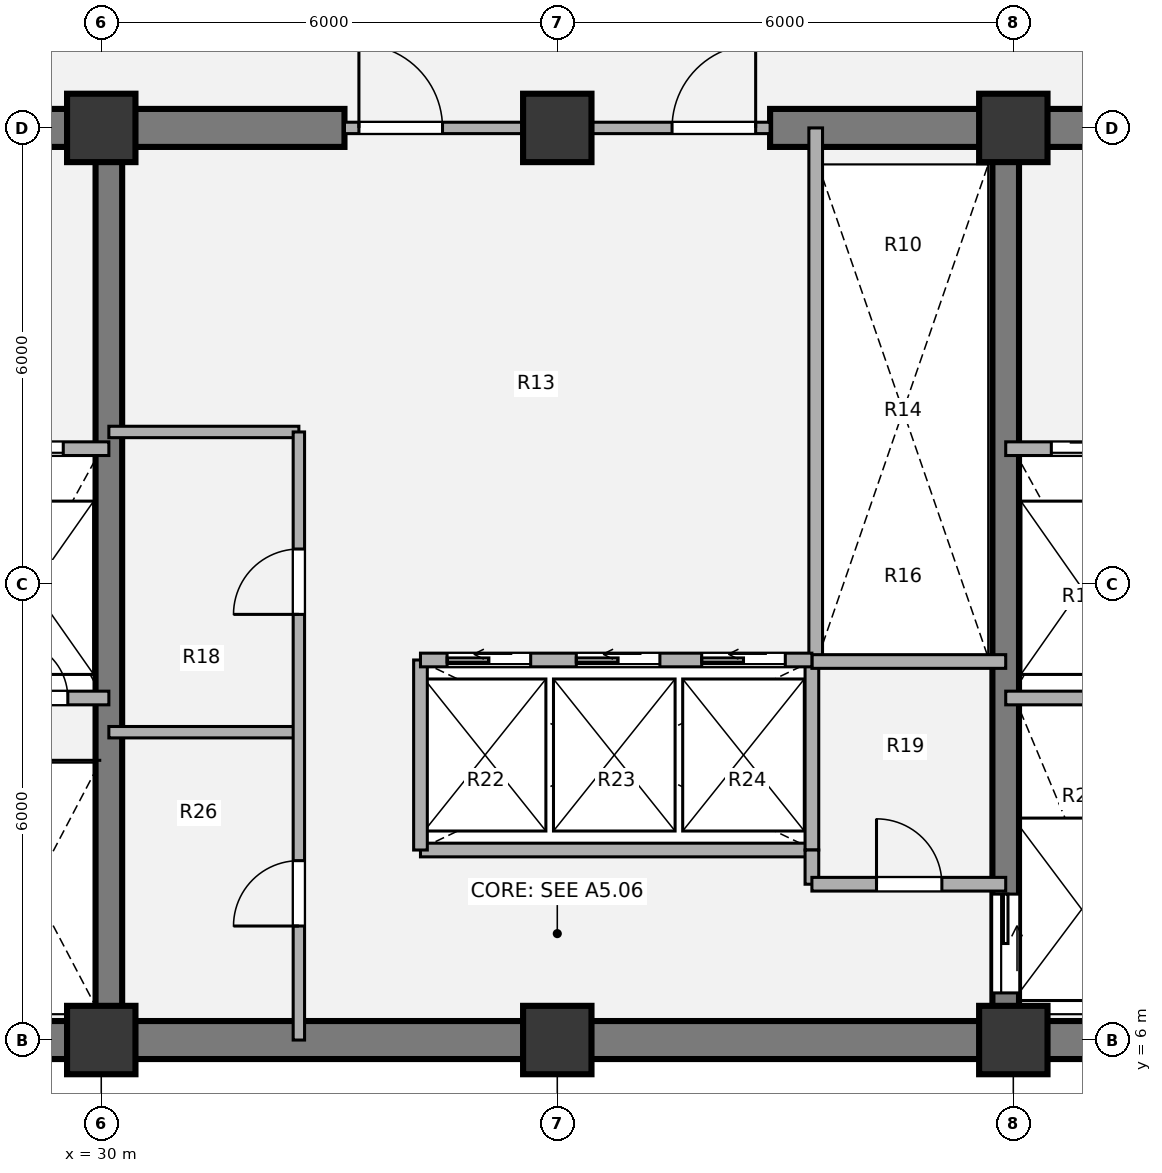
"""IFC4 building model, lengths in metres.
Left out: names, types, materials, properties, quantities, classifications, styles, units other than length and angle.
Written with IfcOpenShell. Run it as: python <this file> out.ifc"""

import sys

from ifc_helpers import new_model, si_unit, direction, frame, frame_2d, origin, origin_2d, place, context, subcontext, project, spatial, rectangle, extrude, source, transform, mapped, element, fill, save


model = new_model("IFC4")
c1 = context("Model", 3, precision=1e-05, world=origin(), true_north=direction((0.0, 1.0)))
c2 = subcontext(c1, "Body", "Model", "MODEL_VIEW")
j1 = project(units=[si_unit("LENGTHUNIT", "METRE"), si_unit("PLANEANGLEUNIT", "RADIAN")], contexts=[c1])
p1 = place(None, origin())
s1 = spatial("IfcSite", under=j1, at=p1, CompositionType="ELEMENT")
p2 = place(p1, origin())
s2 = spatial("IfcBuilding", under=s1, at=p2, CompositionType="ELEMENT")
p3 = place(p2, frame((0.0, 0.0, 108.72)))
s3 = spatial("IfcBuildingStorey", under=s2, at=p3, CompositionType="ELEMENT", Elevation=108.72)
m1 = source(origin(), c2, "Body", "SweptSolid", [
    extrude(rectangle(XDim=0.9, YDim=0.9, at=origin_2d()), origin(), (0.0, 0.0, 1.0), 3.78),
])
for number, where, z_axis, x_axis in (
    (1, (30.0, 6.0, 0.0), (0.0, 0.0, 1.0), (1.0, 0.0, 0.0)),
    (2, (36.0, 6.0, 0.0), (0.0, 0.0, 1.0), (1.0, 0.0, 0.0)),
    (3, (42.0, 6.0, 0.0), (0.0, 0.0, 1.0), (1.0, 0.0, 0.0)),
    (4, (30.0, 18.0, 0.0), (0.0, 0.0, 1.0), (1.0, 0.0, 0.0)),
    (5, (36.0, 18.0, 0.0), (0.0, 0.0, 1.0), (1.0, 0.0, 0.0)),
    (6, (42.0, 18.0, 0.0), (0.0, 0.0, 1.0), (1.0, 0.0, 0.0)),
):
    element("IfcColumn", number, at=place(p3, frame(where, z_axis=z_axis, x_axis=x_axis)), inside=s3, PredefinedType="COLUMN", context=c2, shape_type="MappedRepresentation", body=[
        mapped(m1, transform((0.0, 0.0, 0.0), x_axis=(1.0, 0.0, 0.0), y_axis=(0.0, 1.0, 0.0), z_axis=(0.0, 0.0, 1.0), scale=1.0)),
    ])
p4 = place(p3, frame((48.25, 6.0, 0.0), z_axis=(0.0, 0.0, 1.0), x_axis=(-1.0, 0.0, 0.0)))
e7 = element("IfcWall", 7, at=p4, inside=s3, PredefinedType="SHEAR", context=c2, shape_type="SweptSolid", body=[
    extrude(rectangle(XDim=24.5, YDim=0.5, at=frame_2d((12.25, 0.0))), origin(), (0.0, 0.0, 1.0), 3.78),
])
p5 = place(p3, frame((23.75, 18.0, 0.0), z_axis=(0.0, 0.0, 1.0), x_axis=(1.0, 0.0, 0.0)))
e8 = element("IfcWall", 8, at=p5, inside=s3, PredefinedType="SHEAR", context=c2, shape_type="SweptSolid", body=[
    extrude(rectangle(XDim=9.45, YDim=0.5, at=frame_2d((4.725, 0.0))), origin(), (0.0, 0.0, 1.0), 3.78),
])
p6 = place(p5, frame((2.95, 0.0, 0.0)))
e9 = element("IfcOpeningElement", 9, at=p6, cuts=e8, PredefinedType="OPENING", context=c2, shape_type="SweptSolid", body=[
    extrude(rectangle(XDim=1.1, YDim=2.1, at=origin_2d()), frame((0.55, 0.26, 1.05), z_axis=(0.0, -1.0, 0.0), x_axis=(1.0, 0.0, 0.0)), (0.0, 0.0, 1.0), 0.52),
])
p7 = place(p3, frame((38.8, 18.0, 0.0), z_axis=(0.0, 0.0, 1.0), x_axis=(1.0, 0.0, 0.0)))
e10 = element("IfcWall", 10, at=p7, inside=s3, PredefinedType="SHEAR", context=c2, shape_type="SweptSolid", body=[
    extrude(rectangle(XDim=9.45, YDim=0.5, at=frame_2d((4.725, 0.0))), origin(), (0.0, 0.0, 1.0), 3.78),
])
p8 = place(p7, frame((5.45, 0.0, 0.0)))
e11 = element("IfcOpeningElement", 11, at=p8, cuts=e10, PredefinedType="OPENING", context=c2, shape_type="SweptSolid", body=[
    extrude(rectangle(XDim=1.1, YDim=2.1, at=origin_2d()), frame((0.55, 0.26, 1.05), z_axis=(0.0, -1.0, 0.0), x_axis=(1.0, 0.0, 0.0)), (0.0, 0.0, 1.0), 0.52),
])
p9 = place(p3, frame((30.1, 6.0, 0.0), z_axis=(0.0, 0.0, 1.0), x_axis=(0.0, 1.0, 0.0)))
e12 = element("IfcWall", 12, at=p9, inside=s3, PredefinedType="SHEAR", context=c2, shape_type="SweptSolid", body=[
    extrude(rectangle(XDim=12.0, YDim=0.35, at=frame_2d((6.0, 0.0))), origin(), (0.0, 0.0, 1.0), 3.78),
])
p10 = place(p3, frame((41.9, 18.0, 0.0), z_axis=(0.0, 0.0, 1.0), x_axis=(0.0, -1.0, 0.0)))
e13 = element("IfcWall", 13, at=p10, inside=s3, PredefinedType="SHEAR", context=c2, shape_type="SweptSolid", body=[
    extrude(rectangle(XDim=12.0, YDim=0.35, at=frame_2d((6.0, 0.0))), origin(), (0.0, 0.0, 1.0), 3.78),
])
p11 = place(p10, frame((10.08, 0.0, 0.0)))
e14 = element("IfcOpeningElement", 14, at=p11, cuts=e13, PredefinedType="OPENING", context=c2, shape_type="SweptSolid", body=[
    extrude(rectangle(XDim=1.3, YDim=2.1, at=origin_2d()), frame((0.65, 0.185, 1.05), z_axis=(0.0, -1.0, 0.0), x_axis=(1.0, 0.0, 0.0)), (0.0, 0.0, 1.0), 0.37),
])
p12 = place(p3, frame((30.1, 14.0, 0.0), z_axis=(0.0, 0.0, 1.0), x_axis=(1.0, 0.0, 0.0)))
e15 = element("IfcWall", 15, at=p12, inside=s3, PredefinedType="PARTITIONING", context=c2, shape_type="SweptSolid", body=[
    extrude(rectangle(XDim=2.5, YDim=0.15, at=frame_2d((1.25, 0.0))), origin(), (0.0, 0.0, 1.0), 3.5),
])
p13 = place(p3, frame((34.2, 8.5, 0.0), z_axis=(0.0, 0.0, 1.0), x_axis=(1.0, 0.0, 0.0)))
e16 = element("IfcWall", 16, at=p13, inside=s3, PredefinedType="PARTITIONING", context=c2, shape_type="SweptSolid", body=[
    extrude(rectangle(XDim=5.15, YDim=0.18, at=frame_2d((2.575, 0.0))), origin(), (0.0, 0.0, 1.0), 3.5),
])
for number, where, z_axis, x_axis in (
    (17, (34.2, 8.5, 0.0), (0.0, 0.0, 1.0), (0.0, 1.0, 0.0)),
    (18, (39.35, 8.5, 0.0), (0.0, 0.0, 1.0), (0.0, 1.0, 0.0)),
):
    element("IfcWall", number, at=place(p3, frame(where, z_axis=z_axis, x_axis=x_axis)), inside=s3, PredefinedType="PARTITIONING", context=c2, shape_type="SweptSolid", body=[
        extrude(rectangle(XDim=2.5, YDim=0.18, at=frame_2d((1.25, 0.0))), origin(), (0.0, 0.0, 1.0), 3.5),
    ])
p14 = place(p3, frame((39.4, 11.0, 0.0), z_axis=(0.0, 0.0, 1.0), x_axis=(0.0, 1.0, 0.0)))
e19 = element("IfcWall", 19, at=p14, inside=s3, PredefinedType="PARTITIONING", context=c2, shape_type="SweptSolid", body=[
    extrude(rectangle(XDim=7.0, YDim=0.18, at=frame_2d((3.5, 0.0))), origin(), (0.0, 0.0, 1.0), 3.5),
])
p15 = place(p3, frame((30.1, 10.05, 0.0), z_axis=(0.0, 0.0, 1.0), x_axis=(1.0, 0.0, 0.0)))
e20 = element("IfcWall", 20, at=p15, inside=s3, PredefinedType="PARTITIONING", context=c2, shape_type="SweptSolid", body=[
    extrude(rectangle(XDim=2.5, YDim=0.15, at=frame_2d((1.25, 0.0))), origin(), (0.0, 0.0, 1.0), 3.5),
])
p16 = place(p3, frame((32.6, 6.0, 0.0), z_axis=(0.0, 0.0, 1.0), x_axis=(0.0, 1.0, 0.0)))
e21 = element("IfcWall", 21, at=p16, inside=s3, PredefinedType="PARTITIONING", context=c2, shape_type="SweptSolid", body=[
    extrude(rectangle(XDim=8.0, YDim=0.15, at=frame_2d((4.0, 0.0))), origin(), (0.0, 0.0, 1.0), 3.5),
])
p17 = place(p16, frame((1.5, 0.0, 0.0)))
e22 = element("IfcOpeningElement", 22, at=p17, cuts=e21, PredefinedType="OPENING", context=c2, shape_type="SweptSolid", body=[
    extrude(rectangle(XDim=0.86, YDim=2.1, at=origin_2d()), frame((0.43, 0.085, 1.05), z_axis=(0.0, -1.0, 0.0), x_axis=(1.0, 0.0, 0.0)), (0.0, 0.0, 1.0), 0.17),
])
p18 = place(p16, frame((5.6, 0.0, 0.0)))
e23 = element("IfcOpeningElement", 23, at=p18, cuts=e21, PredefinedType="OPENING", context=c2, shape_type="SweptSolid", body=[
    extrude(rectangle(XDim=0.86, YDim=2.1, at=origin_2d()), frame((0.43, 0.085, 1.05), z_axis=(0.0, -1.0, 0.0), x_axis=(1.0, 0.0, 0.0)), (0.0, 0.0, 1.0), 0.17),
])
p19 = place(p3, frame((39.35, 10.98, 0.0), z_axis=(0.0, 0.0, 1.0), x_axis=(1.0, 0.0, 0.0)))
e24 = element("IfcWall", 24, at=p19, inside=s3, PredefinedType="PARTITIONING", context=c2, shape_type="SweptSolid", body=[
    extrude(rectangle(XDim=2.55, YDim=0.18, at=frame_2d((1.275, 0.0))), origin(), (0.0, 0.0, 1.0), 3.5),
])
p20 = place(p3, frame((39.35, 8.05, 0.0), z_axis=(0.0, 0.0, 1.0), x_axis=(0.0, 1.0, 0.0)))
e25 = element("IfcWall", 25, at=p20, inside=s3, PredefinedType="PARTITIONING", context=c2, shape_type="SweptSolid", body=[
    extrude(rectangle(XDim=0.45, YDim=0.18, at=frame_2d((0.225, 0.0))), origin(), (0.0, 0.0, 1.0), 3.5),
])
p21 = place(p3, frame((39.35, 8.05, 0.0), z_axis=(0.0, 0.0, 1.0), x_axis=(1.0, 0.0, 0.0)))
e26 = element("IfcWall", 26, at=p21, inside=s3, PredefinedType="PARTITIONING", context=c2, shape_type="SweptSolid", body=[
    extrude(rectangle(XDim=2.55, YDim=0.18, at=frame_2d((1.275, 0.0))), origin(), (0.0, 0.0, 1.0), 3.5),
])
p22 = place(p21, frame((0.85, 0.0, 0.0)))
e27 = element("IfcOpeningElement", 27, at=p22, cuts=e26, PredefinedType="OPENING", context=c2, shape_type="SweptSolid", body=[
    extrude(rectangle(XDim=0.86, YDim=2.1, at=origin_2d()), frame((0.43, 0.1, 1.05), z_axis=(0.0, -1.0, 0.0), x_axis=(1.0, 0.0, 0.0)), (0.0, 0.0, 1.0), 0.2),
])
p23 = place(p3, frame((33.2, 18.0, 0.0), z_axis=(0.0, 0.0, 1.0), x_axis=(1.0, 0.0, 0.0)))
e28 = element("IfcWall", 28, at=p23, inside=s3, PredefinedType="PARTITIONING", context=c2, shape_type="SweptSolid", body=[
    extrude(rectangle(XDim=5.6, YDim=0.15, at=frame_2d((2.8, 0.0))), origin(), (0.0, 0.0, 1.0), 2.315),
])
p24 = place(p23, frame((0.19, 0.0, 0.0)))
e29 = element("IfcOpeningElement", 29, at=p24, cuts=e28, PredefinedType="OPENING", context=c2, shape_type="SweptSolid", body=[
    extrude(rectangle(XDim=1.1, YDim=2.1, at=origin_2d()), frame((0.55, 0.085, 1.05), z_axis=(0.0, -1.0, 0.0), x_axis=(1.0, 0.0, 0.0)), (0.0, 0.0, 1.0), 0.17),
])
p25 = place(p23, frame((4.31, 0.0, 0.0)))
e30 = element("IfcOpeningElement", 30, at=p25, cuts=e28, PredefinedType="OPENING", context=c2, shape_type="SweptSolid", body=[
    extrude(rectangle(XDim=1.1, YDim=2.1, at=origin_2d()), frame((0.55, 0.085, 1.05), z_axis=(0.0, -1.0, 0.0), x_axis=(1.0, 0.0, 0.0)), (0.0, 0.0, 1.0), 0.17),
])
p26 = place(p3, frame((24.0, 13.78, 0.0), z_axis=(0.0, 0.0, 1.0), x_axis=(1.0, 0.0, 0.0)))
e31 = element("IfcWall", 31, at=p26, inside=s3, PredefinedType="PARTITIONING", context=c2, shape_type="SweptSolid", body=[
    extrude(rectangle(XDim=6.1, YDim=0.18, at=frame_2d((3.05, 0.0))), origin(), (0.0, 0.0, 1.0), 3.5),
])
p27 = place(p26, frame((1.15, 0.0, 0.0)))
e32 = element("IfcOpeningElement", 32, at=p27, cuts=e31, PredefinedType="OPENING", context=c2, shape_type="SweptSolid", body=[
    extrude(rectangle(XDim=1.1, YDim=2.1, at=origin_2d()), frame((0.55, 0.1, 1.05), z_axis=(0.0, -1.0, 0.0), x_axis=(1.0, 0.0, 0.0)), (0.0, 0.0, 1.0), 0.2),
])
p28 = place(p26, frame((4.4, 0.0, 0.0)))
e33 = element("IfcOpeningElement", 33, at=p28, cuts=e31, PredefinedType="OPENING", context=c2, shape_type="SweptSolid", body=[
    extrude(rectangle(XDim=1.1, YDim=2.1, at=origin_2d()), frame((0.55, 0.1, 1.05), z_axis=(0.0, -1.0, 0.0), x_axis=(1.0, 0.0, 0.0)), (0.0, 0.0, 1.0), 0.2),
])
p29 = place(p3, frame((28.15, 10.5, 0.0), z_axis=(0.0, 0.0, 1.0), x_axis=(1.0, 0.0, 0.0)))
e34 = element("IfcWall", 34, at=p29, inside=s3, PredefinedType="PARTITIONING", context=c2, shape_type="SweptSolid", body=[
    extrude(rectangle(XDim=1.95, YDim=0.18, at=frame_2d((0.975, 0.0))), origin(), (0.0, 0.0, 1.0), 3.5),
])
p30 = place(p29, frame((0.65, 0.0, 0.0)))
e35 = element("IfcOpeningElement", 35, at=p30, cuts=e34, PredefinedType="OPENING", context=c2, shape_type="SweptSolid", body=[
    extrude(rectangle(XDim=0.76, YDim=2.05, at=origin_2d()), frame((0.38, 0.1, 1.025), z_axis=(0.0, -1.0, 0.0), x_axis=(1.0, 0.0, 0.0)), (0.0, 0.0, 1.0), 0.2),
])
p31 = place(p3, frame((41.9, 13.78, 0.0), z_axis=(0.0, 0.0, 1.0), x_axis=(1.0, 0.0, 0.0)))
e36 = element("IfcWall", 36, at=p31, inside=s3, PredefinedType="PARTITIONING", context=c2, shape_type="SweptSolid", body=[
    extrude(rectangle(XDim=6.1, YDim=0.18, at=frame_2d((3.05, 0.0))), origin(), (0.0, 0.0, 1.0), 3.5),
])
p32 = place(p31, frame((0.6, 0.0, 0.0)))
e37 = element("IfcOpeningElement", 37, at=p32, cuts=e36, PredefinedType="OPENING", context=c2, shape_type="SweptSolid", body=[
    extrude(rectangle(XDim=1.1, YDim=2.1, at=origin_2d()), frame((0.55, 0.1, 1.05), z_axis=(0.0, -1.0, 0.0), x_axis=(1.0, 0.0, 0.0)), (0.0, 0.0, 1.0), 0.2),
])
p33 = place(p31, frame((3.8, 0.0, 0.0)))
e38 = element("IfcOpeningElement", 38, at=p33, cuts=e36, PredefinedType="OPENING", context=c2, shape_type="SweptSolid", body=[
    extrude(rectangle(XDim=1.1, YDim=2.1, at=origin_2d()), frame((0.55, 0.1, 1.05), z_axis=(0.0, -1.0, 0.0), x_axis=(1.0, 0.0, 0.0)), (0.0, 0.0, 1.0), 0.2),
])
p34 = place(p3, frame((41.9, 10.5, 0.0), z_axis=(0.0, 0.0, 1.0), x_axis=(1.0, 0.0, 0.0)))
e39 = element("IfcWall", 39, at=p34, inside=s3, PredefinedType="PARTITIONING", context=c2, shape_type="SweptSolid", body=[
    extrude(rectangle(XDim=1.95, YDim=0.18, at=frame_2d((0.975, 0.0))), origin(), (0.0, 0.0, 1.0), 3.5),
])
p35 = place(p3, frame((34.2, 11.0, 0.0), z_axis=(0.0, 0.0, 1.0), x_axis=(1.0, 0.0, 0.0)))
e40 = element("IfcWall", 40, at=p35, inside=s3, PredefinedType="PARTITIONING", context=c2, shape_type="SweptSolid", body=[
    extrude(rectangle(XDim=5.15, YDim=0.18, at=frame_2d((2.575, 0.0))), origin(), (0.0, 0.0, 1.0), 3.5),
])
p36 = place(p35, frame((0.35, 0.0, 0.0)))
e41 = element("IfcOpeningElement", 41, at=p36, cuts=e40, PredefinedType="OPENING", context=c2, shape_type="SweptSolid", body=[
    extrude(rectangle(XDim=1.1, YDim=2.1, at=origin_2d()), frame((0.55, 0.1, 1.05), z_axis=(0.0, -1.0, 0.0), x_axis=(1.0, 0.0, 0.0)), (0.0, 0.0, 1.0), 0.2),
])
p37 = place(p35, frame((2.05, 0.0, 0.0)))
e42 = element("IfcOpeningElement", 42, at=p37, cuts=e40, PredefinedType="OPENING", context=c2, shape_type="SweptSolid", body=[
    extrude(rectangle(XDim=1.1, YDim=2.1, at=origin_2d()), frame((0.55, 0.1, 1.05), z_axis=(0.0, -1.0, 0.0), x_axis=(1.0, 0.0, 0.0)), (0.0, 0.0, 1.0), 0.2),
])
p38 = place(p35, frame((3.7, 0.0, 0.0)))
e43 = element("IfcOpeningElement", 43, at=p38, cuts=e40, PredefinedType="OPENING", context=c2, shape_type="SweptSolid", body=[
    extrude(rectangle(XDim=1.1, YDim=2.1, at=origin_2d()), frame((0.55, 0.1, 1.05), z_axis=(0.0, -1.0, 0.0), x_axis=(1.0, 0.0, 0.0)), (0.0, 0.0, 1.0), 0.2),
])
m2 = source(origin(), c2, "Body", "SweptSolid", [
    extrude(rectangle(XDim=0.86, YDim=2.1, at=origin_2d()), frame((0.43, 0.025, 1.05), z_axis=(0.0, -1.0, 0.0), x_axis=(1.0, 0.0, 0.0)), (0.0, 0.0, 1.0), 0.05),
])
p39 = place(p17, origin())
e44 = element("IfcDoor", 44, at=p39, inside=s3, OperationType="SINGLE_SWING_LEFT", PredefinedType="DOOR", context=c2, shape_type="MappedRepresentation", body=[
    mapped(m2, transform((0.0, 0.0, 0.0), x_axis=(1.0, 0.0, 0.0), y_axis=(0.0, 1.0, 0.0), z_axis=(0.0, 0.0, 1.0), scale=1.0)),
])
fill(e22, e44)
p40 = place(p18, origin())
e45 = element("IfcDoor", 45, at=p40, inside=s3, OperationType="SINGLE_SWING_LEFT", PredefinedType="DOOR", context=c2, shape_type="MappedRepresentation", body=[
    mapped(m2, transform((0.0, 0.0, 0.0), x_axis=(1.0, 0.0, 0.0), y_axis=(0.0, 1.0, 0.0), z_axis=(0.0, 0.0, 1.0), scale=1.0)),
])
fill(e23, e45)
p41 = place(p22, origin())
e46 = element("IfcDoor", 46, at=p41, inside=s3, OperationType="SINGLE_SWING_LEFT", PredefinedType="DOOR", context=c2, shape_type="MappedRepresentation", body=[
    mapped(m2, transform((0.0, 0.0, 0.0), x_axis=(1.0, 0.0, 0.0), y_axis=(0.0, 1.0, 0.0), z_axis=(0.0, 0.0, 1.0), scale=1.0)),
])
fill(e27, e46)
m3 = source(origin(), c2, "Body", "SweptSolid", [
    extrude(rectangle(XDim=1.1, YDim=2.1, at=origin_2d()), frame((0.55, 0.025, 1.05), z_axis=(0.0, -1.0, 0.0), x_axis=(1.0, 0.0, 0.0)), (0.0, 0.0, 1.0), 0.05),
])
p42 = place(p24, origin())
e47 = element("IfcDoor", 47, at=p42, inside=s3, OperationType="SINGLE_SWING_LEFT", PredefinedType="DOOR", context=c2, shape_type="MappedRepresentation", body=[
    mapped(m3, transform((0.0, 0.0, 0.0), x_axis=(1.0, 0.0, 0.0), y_axis=(0.0, 1.0, 0.0), z_axis=(0.0, 0.0, 1.0), scale=1.0)),
])
fill(e29, e47)
p43 = place(p25, origin())
e48 = element("IfcDoor", 48, at=p43, inside=s3, OperationType="SINGLE_SWING_RIGHT", PredefinedType="DOOR", context=c2, shape_type="MappedRepresentation", body=[
    mapped(m3, transform((0.0, 0.0, 0.0), x_axis=(1.0, 0.0, 0.0), y_axis=(0.0, 1.0, 0.0), z_axis=(0.0, 0.0, 1.0), scale=1.0)),
])
fill(e30, e48)
m4 = source(origin(), c2, "Body", "SweptSolid", [
    extrude(rectangle(XDim=1.1, YDim=2.1, at=origin_2d()), frame((0.55, 0.025, 1.05), z_axis=(0.0, -1.0, 0.0), x_axis=(1.0, 0.0, 0.0)), (0.0, 0.0, 1.0), 0.05),
])
p44 = place(p28, origin())
e49 = element("IfcDoor", 49, at=p44, inside=s3, OperationType="SLIDING_TO_LEFT", PredefinedType="DOOR", context=c2, shape_type="MappedRepresentation", body=[
    mapped(m4, transform((0.0, 0.0, 0.0), x_axis=(1.0, 0.0, 0.0), y_axis=(0.0, 1.0, 0.0), z_axis=(0.0, 0.0, 1.0), scale=1.0)),
])
fill(e33, e49)
m5 = source(origin(), c2, "Body", "SweptSolid", [
    extrude(rectangle(XDim=0.76, YDim=2.05, at=origin_2d()), frame((0.38, 0.025, 1.025), z_axis=(0.0, -1.0, 0.0), x_axis=(1.0, 0.0, 0.0)), (0.0, 0.0, 1.0), 0.05),
])
p45 = place(p30, origin())
e50 = element("IfcDoor", 50, at=p45, inside=s3, OperationType="SINGLE_SWING_LEFT", PredefinedType="DOOR", context=c2, shape_type="MappedRepresentation", body=[
    mapped(m5, transform((0.0, 0.0, 0.0), x_axis=(1.0, 0.0, 0.0), y_axis=(0.0, 1.0, 0.0), z_axis=(0.0, 0.0, 1.0), scale=1.0)),
])
fill(e35, e50)
p46 = place(p32, origin())
e51 = element("IfcDoor", 51, at=p46, inside=s3, OperationType="SLIDING_TO_RIGHT", PredefinedType="DOOR", context=c2, shape_type="MappedRepresentation", body=[
    mapped(m4, transform((0.0, 0.0, 0.0), x_axis=(1.0, 0.0, 0.0), y_axis=(0.0, 1.0, 0.0), z_axis=(0.0, 0.0, 1.0), scale=1.0)),
])
fill(e37, e51)
m6 = source(origin(), c2, "Body", "SweptSolid", [
    extrude(rectangle(XDim=1.3, YDim=2.1, at=origin_2d()), frame((0.65, 0.025, 1.05), z_axis=(0.0, -1.0, 0.0), x_axis=(1.0, 0.0, 0.0)), (0.0, 0.0, 1.0), 0.05),
])
p47 = place(p11, origin())
e52 = element("IfcDoor", 52, at=p47, inside=s3, OperationType="SLIDING_TO_LEFT", PredefinedType="DOOR", context=c2, shape_type="MappedRepresentation", body=[
    mapped(m6, transform((0.0, 0.0, 0.0), x_axis=(1.0, 0.0, 0.0), y_axis=(0.0, 1.0, 0.0), z_axis=(0.0, 0.0, 1.0), scale=1.0)),
])
fill(e14, e52)
p48 = place(p36, origin())
e53 = element("IfcDoor", 53, at=p48, inside=s3, OperationType="SLIDING_TO_LEFT", PredefinedType="DOOR", context=c2, shape_type="MappedRepresentation", body=[
    mapped(m4, transform((0.0, 0.0, 0.0), x_axis=(1.0, 0.0, 0.0), y_axis=(0.0, 1.0, 0.0), z_axis=(0.0, 0.0, 1.0), scale=1.0)),
])
fill(e41, e53)
p49 = place(p37, origin())
e54 = element("IfcDoor", 54, at=p49, inside=s3, OperationType="SLIDING_TO_LEFT", PredefinedType="DOOR", context=c2, shape_type="MappedRepresentation", body=[
    mapped(m4, transform((0.0, 0.0, 0.0), x_axis=(1.0, 0.0, 0.0), y_axis=(0.0, 1.0, 0.0), z_axis=(0.0, 0.0, 1.0), scale=1.0)),
])
fill(e42, e54)
p50 = place(p38, origin())
e55 = element("IfcDoor", 55, at=p50, inside=s3, OperationType="SLIDING_TO_LEFT", PredefinedType="DOOR", context=c2, shape_type="MappedRepresentation", body=[
    mapped(m4, transform((0.0, 0.0, 0.0), x_axis=(1.0, 0.0, 0.0), y_axis=(0.0, 1.0, 0.0), z_axis=(0.0, 0.0, 1.0), scale=1.0)),
])
fill(e43, e55)
save(model, sys.argv[1])
